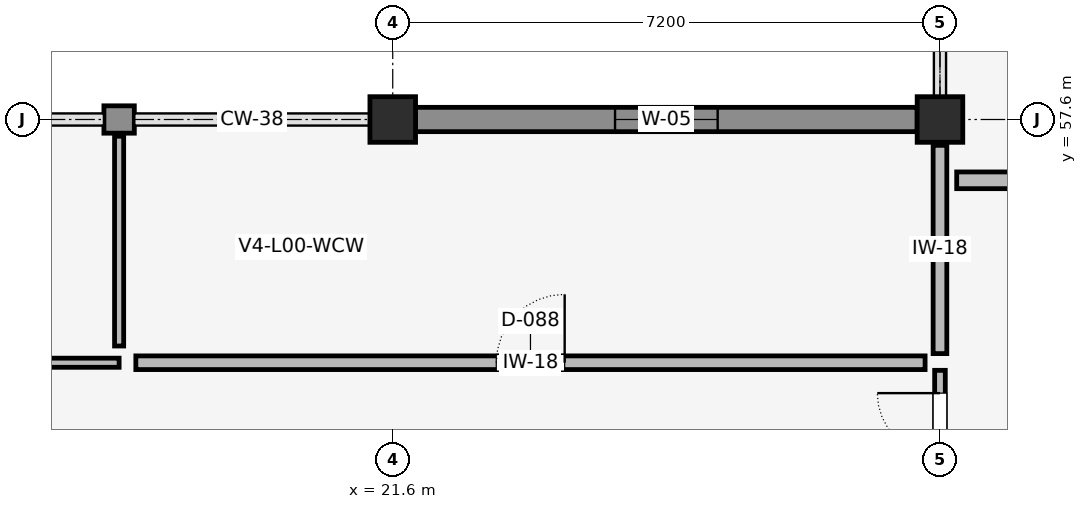
"""IFC4 building model, lengths in metres.
Left out: names, types, materials, properties, quantities, classifications, styles, units other than length and angle.
Written with IfcOpenShell. Run it as: python <this file> out.ifc"""

import sys

from ifc_helpers import new_model, si_unit, direction, frame, frame_2d, origin, origin_2d, place, context, subcontext, project, spatial, rectangle, extrude, element, fill, save


model = new_model("IFC4")
c1 = context("Model", 3, precision=1e-05, world=origin(), true_north=direction((0.0, 1.0)))
c2 = subcontext(c1, "Body", "Model", "MODEL_VIEW")
j1 = project(units=[si_unit("LENGTHUNIT", "METRE"), si_unit("PLANEANGLEUNIT", "RADIAN")], contexts=[c1])
p1 = place(None, origin())
s1 = spatial("IfcSite", under=j1, at=p1, CompositionType="ELEMENT")
p2 = place(p1, origin())
s2 = spatial("IfcBuilding", under=s1, at=p2, CompositionType="ELEMENT")
p3 = place(p2, origin())
s3 = spatial("IfcBuildingStorey", under=s2, at=p3, CompositionType="ELEMENT", Elevation=0.0)
for number, where, z_axis, x_axis in (
    (1, (21.6, 57.6, 0.0), (0.0, 0.0, 1.0), (1.0, 0.0, 0.0)),
    (2, (28.8, 57.6, 0.0), (0.0, 0.0, 1.0), (1.0, 0.0, 0.0)),
):
    element("IfcColumn", number, at=place(p3, frame(where, z_axis=z_axis, x_axis=x_axis)), inside=s3, PredefinedType="COLUMN", context=c2, shape_type="SweptSolid", body=[
        extrude(rectangle(XDim=0.6, YDim=0.6, at=origin_2d()), origin(), (0.0, 0.0, 1.0), 5.4),
    ])
p4 = place(p3, frame((17.8, 57.6, 0.0), z_axis=(0.0, 0.0, 1.0), x_axis=(1.0, 0.0, 0.0)))
e3 = element("IfcWall", 3, at=p4, inside=s3, PredefinedType="SOLIDWALL", context=c2, shape_type="SweptSolid", body=[
    extrude(rectangle(XDim=0.4, YDim=0.36, at=frame_2d((0.2, 0.0))), origin(), (0.0, 0.0, 1.0), 4.45),
])
p5 = place(p3, frame((21.9, 57.6, 0.0), z_axis=(0.0, 0.0, 1.0), x_axis=(1.0, 0.0, 0.0)))
e4 = element("IfcWall", 4, at=p5, inside=s3, PredefinedType="ELEMENTEDWALL", context=c2, shape_type="SweptSolid", body=[
    extrude(rectangle(XDim=6.6, YDim=0.32, at=frame_2d((3.3, 0.0))), origin(), (0.0, 0.0, 1.0), 4.4),
])
p6 = place(p5, frame((2.625, 0.0, 0.85)))
e5 = element("IfcOpeningElement", 5, at=p6, cuts=e4, PredefinedType="OPENING", context=c2, shape_type="SweptSolid", body=[
    extrude(rectangle(XDim=1.35, YDim=2.0, at=frame_2d((0.675, 1.0))), frame((0.0, 0.172, 0.0), z_axis=(0.0, -1.0, 0.0), x_axis=(1.0, 0.0, 0.0)), (0.0, 0.0, 1.0), 0.344),
])
p7 = place(p3, frame((28.8, 52.1, 0.0), z_axis=(0.0, 0.0, 1.0), x_axis=(0.0, 1.0, 0.0)))
e6 = element("IfcWall", 6, at=p7, inside=s3, PredefinedType="PARTITIONING", context=c2, shape_type="SweptSolid", body=[
    extrude(rectangle(XDim=2.2, YDim=0.14, at=frame_2d((1.1, 0.0))), origin(), (0.0, 0.0, 1.0), 4.488),
])
p8 = place(p7, frame((0.25, 0.0, 0.0)))
e7 = element("IfcOpeningElement", 7, at=p8, cuts=e6, PredefinedType="OPENING", context=c2, shape_type="SweptSolid", body=[
    extrude(rectangle(XDim=1.65, YDim=2.2, at=frame_2d((0.825, 1.1))), frame((0.0, 0.082, 0.0), z_axis=(0.0, -1.0, 0.0), x_axis=(1.0, 0.0, 0.0)), (0.0, 0.0, 1.0), 0.164),
])
p9 = place(p3, frame((0.22, 54.4, 0.0), z_axis=(0.0, 0.0, 1.0), x_axis=(1.0, 0.0, 0.0)))
e8 = element("IfcWall", 8, at=p9, inside=s3, PredefinedType="PARTITIONING", context=c2, shape_type="SweptSolid", body=[
    extrude(rectangle(XDim=17.78, YDim=0.12, at=frame_2d((8.89, 0.0))), origin(), (0.0, 0.0, 1.0), 4.488),
])
p10 = place(p9, frame((8.39, 0.0, 0.0)))
e9 = element("IfcOpeningElement", 9, at=p10, cuts=e8, PredefinedType="OPENING", context=c2, shape_type="SweptSolid", body=[
    extrude(rectangle(XDim=1.0, YDim=2.15, at=frame_2d((0.5, 1.075))), frame((0.0, 0.072, 0.0), z_axis=(0.0, -1.0, 0.0), x_axis=(1.0, 0.0, 0.0)), (0.0, 0.0, 1.0), 0.144),
])
p11 = place(p3, frame((18.0, 54.62, 0.0), z_axis=(0.0, 0.0, 1.0), x_axis=(0.0, 1.0, 0.0)))
e10 = element("IfcWall", 10, at=p11, inside=s3, PredefinedType="PARTITIONING", context=c2, shape_type="SweptSolid", body=[
    extrude(rectangle(XDim=2.76, YDim=0.12, at=frame_2d((1.38, 0.0))), origin(), (0.0, 0.0, 1.0), 4.448),
])
p12 = place(p3, frame((18.22, 54.4, 0.0), z_axis=(0.0, 0.0, 1.0), x_axis=(1.0, 0.0, 0.0)))
e11 = element("IfcWall", 11, at=p12, inside=s3, PredefinedType="PLUMBINGWALL", context=c2, shape_type="SweptSolid", body=[
    extrude(rectangle(XDim=10.384, YDim=0.18, at=frame_2d((5.192, 0.0))), origin(), (0.0, 0.0, 1.0), 4.498),
])
p13 = place(p12, frame((4.742, 0.0, 0.0)))
e12 = element("IfcOpeningElement", 12, at=p13, cuts=e11, PredefinedType="OPENING", context=c2, shape_type="SweptSolid", body=[
    extrude(rectangle(XDim=0.9, YDim=2.1, at=frame_2d((0.45, 1.05))), frame((0.0, 0.102, 0.0), z_axis=(0.0, -1.0, 0.0), x_axis=(1.0, 0.0, 0.0)), (0.0, 0.0, 1.0), 0.204),
])
p14 = place(p3, frame((28.8, 54.52, 0.0), z_axis=(0.0, 0.0, 1.0), x_axis=(0.0, 1.0, 0.0)))
e13 = element("IfcWall", 13, at=p14, inside=s3, PredefinedType="PLUMBINGWALL", context=c2, shape_type="SweptSolid", body=[
    extrude(rectangle(XDim=2.74, YDim=0.18, at=frame_2d((1.37, 0.0))), origin(), (0.0, 0.0, 1.0), 4.488),
])
p15 = place(p3, frame((29.02, 56.8, 0.0), z_axis=(0.0, 0.0, 1.0), x_axis=(1.0, 0.0, 0.0)))
e14 = element("IfcWall", 14, at=p15, inside=s3, PredefinedType="STANDARD", context=c2, shape_type="SweptSolid", body=[
    extrude(rectangle(XDim=3.08, YDim=0.22, at=frame_2d((1.54, 0.0))), origin(), (0.0, 0.0, 1.0), 5.12),
])
p16 = place(p15, frame((0.94, 0.0, 0.0)))
e15 = element("IfcOpeningElement", 15, at=p16, cuts=e14, PredefinedType="OPENING", context=c2, shape_type="SweptSolid", body=[
    extrude(rectangle(XDim=1.2, YDim=2.2, at=frame_2d((0.6, 1.1))), frame((0.0, 0.122, 0.0), z_axis=(0.0, -1.0, 0.0), x_axis=(1.0, 0.0, 0.0)), (0.0, 0.0, 1.0), 0.244),
])
p17 = place(p6, origin())
e16 = element("IfcWindow", 16, at=p17, inside=s3, PartitioningType="SINGLE_PANEL", PredefinedType="WINDOW", context=c2, shape_type="SweptSolid", body=[
    extrude(rectangle(XDim=1.35, YDim=2.0, at=frame_2d((0.675, 1.0))), frame((0.0, 0.03, 0.0), z_axis=(0.0, -1.0, 0.0), x_axis=(1.0, 0.0, 0.0)), (0.0, 0.0, 1.0), 0.06),
])
fill(e5, e16)
p18 = place(p8, origin())
e17 = element("IfcDoor", 17, at=p18, inside=s3, OperationType="DOUBLE_SWING_LEFT", PredefinedType="DOOR", context=c2, shape_type="SweptSolid", body=[
    extrude(rectangle(XDim=1.65, YDim=2.2, at=frame_2d((0.825, 1.1))), frame((0.0, 0.025, 0.0), z_axis=(0.0, -1.0, 0.0), x_axis=(1.0, 0.0, 0.0)), (0.0, 0.0, 1.0), 0.05),
])
fill(e7, e17)
p19 = place(p13, origin())
e18 = element("IfcDoor", 18, at=p19, inside=s3, OperationType="SINGLE_SWING_RIGHT", PredefinedType="DOOR", context=c2, shape_type="SweptSolid", body=[
    extrude(rectangle(XDim=0.9, YDim=2.1, at=frame_2d((0.45, 1.05))), frame((0.0, 0.025, 0.0), z_axis=(0.0, -1.0, 0.0), x_axis=(1.0, 0.0, 0.0)), (0.0, 0.0, 1.0), 0.05),
])
fill(e12, e18)
save(model, sys.argv[1])
